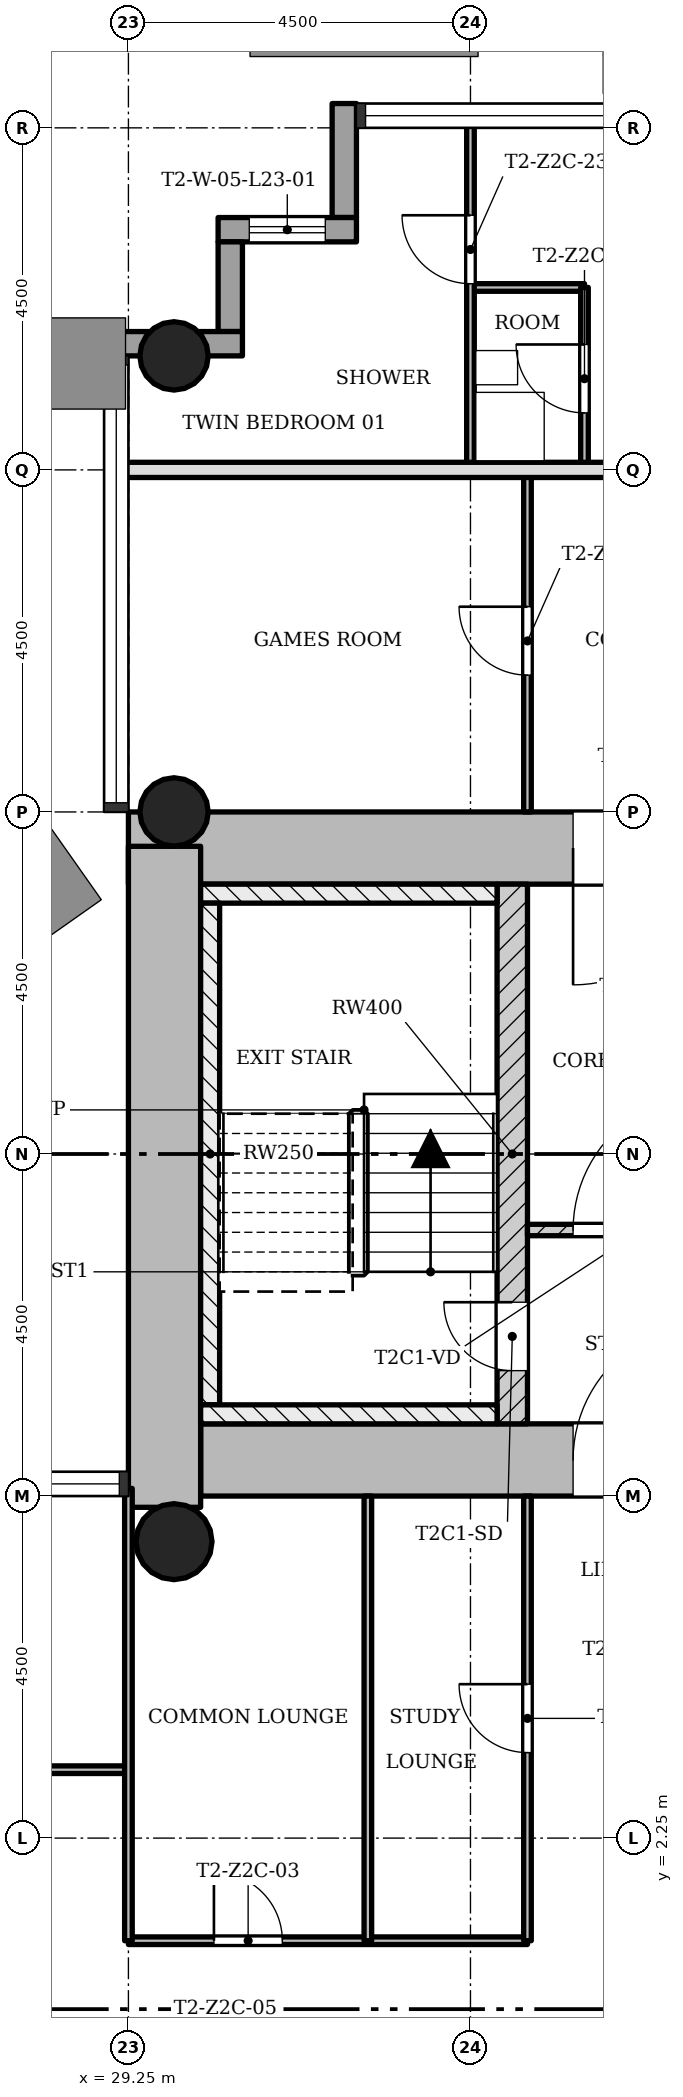
"""IFC4 building model, lengths in metres.
Left out: names, types, materials, properties, quantities, classifications, styles, units other than length and angle.
Written with IfcOpenShell. Run it as: python <this file> out.ifc"""

import sys

from ifc_helpers import new_model, si_unit, direction, frame, frame_2d, origin, origin_2d, place, context, subcontext, project, spatial, rectangle, hollow_circle, extrude, element, fill, save


model = new_model("IFC4")
c1 = context("Model", 3, precision=1e-05, world=origin(), true_north=direction((0.0, 1.0)))
c2 = subcontext(c1, "Body", "Model", "MODEL_VIEW")
j1 = project(units=[si_unit("LENGTHUNIT", "METRE"), si_unit("PLANEANGLEUNIT", "RADIAN")], contexts=[c1])
p1 = place(None, origin())
s1 = spatial("IfcSite", under=j1, at=p1, CompositionType="ELEMENT")
p2 = place(p1, origin())
s2 = spatial("IfcBuilding", under=s1, at=p2, CompositionType="ELEMENT")
p3 = place(p2, frame((0.0, 0.0, 86.8)))
s3 = spatial("IfcBuildingStorey", under=s2, at=p3, CompositionType="ELEMENT", Elevation=86.8)
p4 = place(p3, frame((30.2, 7.225, 0.0), z_axis=(0.0, 0.0, 1.0), x_axis=(1.0, 0.0, 0.0)))
e1 = element("IfcWall", 1, at=p4, inside=s3, PredefinedType="SHEAR", context=c2, shape_type="SweptSolid", body=[
    extrude(rectangle(XDim=12.55, YDim=0.95, at=frame_2d((6.275, 0.0))), origin(), (0.0, 0.0, 1.0), 3.4),
])
p5 = place(p4, frame((4.9, 0.0, 0.0)))
e2 = element("IfcOpeningElement", 2, at=p5, cuts=e1, PredefinedType="OPENING", context=c2, shape_type="SweptSolid", body=[
    extrude(rectangle(XDim=1.8, YDim=2.1, at=frame_2d((0.9, 1.05))), frame((0.0, 0.485, 0.0), z_axis=(0.0, -1.0, 0.0), x_axis=(1.0, 0.0, 0.0)), (0.0, 0.0, 1.0), 0.97),
])
p6 = place(p3, frame((41.8, 15.275, 0.0), z_axis=(0.0, 0.0, 1.0), x_axis=(-1.0, 0.0, 0.0)))
e3 = element("IfcWall", 3, at=p6, inside=s3, PredefinedType="SHEAR", context=c2, shape_type="SweptSolid", body=[
    extrude(rectangle(XDim=12.55, YDim=0.95, at=frame_2d((6.275, 0.0))), origin(), (0.0, 0.0, 1.0), 3.4),
])
p7 = place(p6, frame((4.9, 0.0, 0.0)))
e4 = element("IfcOpeningElement", 4, at=p7, cuts=e3, PredefinedType="OPENING", context=c2, shape_type="SweptSolid", body=[
    extrude(rectangle(XDim=1.8, YDim=2.1, at=frame_2d((0.9, 1.05))), frame((0.0, 0.485, 0.0), z_axis=(0.0, -1.0, 0.0), x_axis=(1.0, 0.0, 0.0)), (0.0, 0.0, 1.0), 0.97),
])
p8 = place(p3, frame((29.725, 15.298, 0.0), z_axis=(0.0, 0.0, 1.0), x_axis=(0.0, -1.0, 0.0)))
e5 = element("IfcWall", 5, at=p8, inside=s3, PredefinedType="SHEAR", context=c2, shape_type="SweptSolid", body=[
    extrude(rectangle(XDim=8.696, YDim=0.95, at=frame_2d((4.348, 0.0))), origin(), (0.0, 0.0, 1.0), 3.4),
])
p9 = place(p3, frame((34.3, 7.7, 0.0), z_axis=(0.0, 0.0, 1.0), x_axis=(0.0, 1.0, 0.0)))
e6 = element("IfcWall", 6, at=p9, inside=s3, PredefinedType="SHEAR", context=c2, shape_type="SweptSolid", body=[
    extrude(rectangle(XDim=7.1, YDim=0.4, at=frame_2d((3.55, 0.0))), origin(), (0.0, 0.0, 1.0), 3.4),
])
p10 = place(p9, frame((0.7, 0.0, 0.0)))
e7 = element("IfcOpeningElement", 7, at=p10, cuts=e6, PredefinedType="OPENING", context=c2, shape_type="SweptSolid", body=[
    extrude(rectangle(XDim=0.9, YDim=2.1, at=frame_2d((0.45, 1.05))), frame((0.0, 0.21, 0.0), z_axis=(0.0, -1.0, 0.0), x_axis=(1.0, 0.0, 0.0)), (0.0, 0.0, 1.0), 0.42),
])
for number, where, z_axis, x_axis in (
    (8, (29.85, 15.75, 0.0), (0.0, 0.0, 1.0), (1.0, 0.0, 0.0)),
    (9, (29.85, 21.75, 0.0), (0.0, 0.0, 1.0), (1.0, 0.0, 0.0)),
):
    element("IfcColumn", number, at=place(p3, frame(where, z_axis=z_axis, x_axis=x_axis)), inside=s3, PredefinedType="COLUMN", context=c2, shape_type="SweptSolid", body=[
        extrude(hollow_circle(Radius=0.45, WallThickness=0.032, at=origin_2d()), origin(), (0.0, 0.0, 1.0), 3.4),
    ])
p11 = place(p3, frame((29.85, 6.15, 0.0), z_axis=(0.0, 0.0, 1.0), x_axis=(1.0, 0.0, 0.0)))
e10 = element("IfcColumn", 10, at=p11, inside=s3, PredefinedType="COLUMN", context=c2, shape_type="SweptSolid", body=[
    extrude(hollow_circle(Radius=0.5, WallThickness=0.036, at=origin_2d()), origin(), (0.0, 0.0, 1.0), 3.4),
])
p12 = place(p3, frame((32.09, 25.07, -0.3), z_axis=(0.0, 0.0, 1.0), x_axis=(0.0, -1.0, 0.0)))
e11 = element("IfcWall", 11, at=p12, inside=s3, PredefinedType="STANDARD", context=c2, shape_type="SweptSolid", body=[
    extrude(rectangle(XDim=1.5, YDim=0.32, at=frame_2d((0.75, 0.0))), origin(), (0.0, 0.0, 1.0), 3.4),
])
p13 = place(p3, frame((32.25, 23.41, -0.3), z_axis=(0.0, 0.0, 1.0), x_axis=(-1.0, 0.0, 0.0)))
e12 = element("IfcWall", 12, at=p13, inside=s3, PredefinedType="STANDARD", context=c2, shape_type="SweptSolid", body=[
    extrude(rectangle(XDim=1.82, YDim=0.32, at=frame_2d((0.91, 0.0))), origin(), (0.0, 0.0, 1.0), 3.4),
])
p14 = place(p13, frame((0.41, 0.0, 1.2)))
e13 = element("IfcOpeningElement", 13, at=p14, cuts=e12, PredefinedType="OPENING", context=c2, shape_type="SweptSolid", body=[
    extrude(rectangle(XDim=1.0, YDim=1.5, at=frame_2d((0.5, 0.75))), frame((0.0, 0.17, 0.0), z_axis=(0.0, -1.0, 0.0), x_axis=(1.0, 0.0, 0.0)), (0.0, 0.0, 1.0), 0.34),
])
p15 = place(p3, frame((30.59, 23.25, -0.3), z_axis=(0.0, 0.0, 1.0), x_axis=(0.0, -1.0, 0.0)))
e14 = element("IfcWall", 14, at=p15, inside=s3, PredefinedType="STANDARD", context=c2, shape_type="SweptSolid", body=[
    extrude(rectangle(XDim=1.18, YDim=0.32, at=frame_2d((0.59, 0.0))), origin(), (0.0, 0.0, 1.0), 3.4),
])
p16 = place(p3, frame((30.75, 21.91, -0.3), z_axis=(0.0, 0.0, 1.0), x_axis=(-1.0, 0.0, 0.0)))
e15 = element("IfcWall", 15, at=p16, inside=s3, PredefinedType="STANDARD", context=c2, shape_type="SweptSolid", body=[
    extrude(rectangle(XDim=1.82, YDim=0.32, at=frame_2d((0.91, 0.0))), origin(), (0.0, 0.0, 1.0), 3.4),
])
p17 = place(p3, frame((37.5, 10.25, 0.0), z_axis=(0.0, 0.0, 1.0), x_axis=(-1.0, 0.0, 0.0)))
e16 = element("IfcWall", 16, at=p17, inside=s3, PredefinedType="PARTITIONING", context=c2, shape_type="SweptSolid", body=[
    extrude(rectangle(XDim=3.0, YDim=0.15, at=frame_2d((1.5, 0.0))), origin(), (0.0, 0.0, 1.0), 3.0),
])
p18 = place(p17, frame((0.6, 0.0, 0.0)))
e17 = element("IfcOpeningElement", 17, at=p18, cuts=e16, PredefinedType="OPENING", context=c2, shape_type="SweptSolid", body=[
    extrude(rectangle(XDim=1.8, YDim=2.1, at=frame_2d((0.9, 1.05))), frame((0.0, 0.085, 0.0), z_axis=(0.0, -1.0, 0.0), x_axis=(1.0, 0.0, 0.0)), (0.0, 0.0, 1.0), 0.17),
])
p19 = place(p3, frame((34.5, 0.9, 0.0), z_axis=(0.0, 0.0, 1.0), x_axis=(-1.0, 0.0, 0.0)))
e18 = element("IfcWall", 18, at=p19, inside=s3, PredefinedType="PARTITIONING", context=c2, shape_type="SweptSolid", body=[
    extrude(rectangle(XDim=5.25, YDim=0.1, at=frame_2d((2.625, 0.0))), origin(), (0.0, 0.0, 1.0), 3.0),
])
p20 = place(p19, frame((3.225, 0.0, 0.0)))
e19 = element("IfcOpeningElement", 19, at=p20, cuts=e18, PredefinedType="OPENING", context=c2, shape_type="SweptSolid", body=[
    extrude(rectangle(XDim=0.9, YDim=2.1, at=frame_2d((0.45, 1.05))), frame((0.0, 0.06, 0.0), z_axis=(0.0, -1.0, 0.0), x_axis=(1.0, 0.0, 0.0)), (0.0, 0.0, 1.0), 0.12),
])
p21 = place(p3, frame((29.25, 3.15, 0.0), z_axis=(0.0, 0.0, 1.0), x_axis=(-1.0, 0.0, 0.0)))
e20 = element("IfcWall", 20, at=p21, inside=s3, PredefinedType="PARTITIONING", context=c2, shape_type="SweptSolid", body=[
    extrude(rectangle(XDim=9.0, YDim=0.1, at=frame_2d((4.5, 0.0))), origin(), (0.0, 0.0, 1.0), 3.0),
])
p22 = place(p21, frame((2.55, 0.0, 0.0)))
e21 = element("IfcOpeningElement", 21, at=p22, cuts=e20, PredefinedType="OPENING", context=c2, shape_type="SweptSolid", body=[
    extrude(rectangle(XDim=0.9, YDim=2.1, at=frame_2d((0.45, 1.05))), frame((0.0, 0.06, 0.0), z_axis=(0.0, -1.0, 0.0), x_axis=(1.0, 0.0, 0.0)), (0.0, 0.0, 1.0), 0.12),
])
p23 = place(p3, frame((42.85, 20.25, 0.0), z_axis=(0.0, 0.0, 1.0), x_axis=(-1.0, 0.0, 0.0)))
e22 = element("IfcWall", 22, at=p23, inside=s3, PredefinedType="SOLIDWALL", context=c2, shape_type="SweptSolid", body=[
    extrude(rectangle(XDim=13.7, YDim=0.2, at=frame_2d((6.85, 0.0))), origin(), (0.0, 0.0, 1.0), 3.0),
])
p24 = place(p23, frame((6.4, 0.0, 0.0)))
e23 = element("IfcOpeningElement", 23, at=p24, cuts=e22, PredefinedType="OPENING", context=c2, shape_type="SweptSolid", body=[
    extrude(rectangle(XDim=0.9, YDim=2.1, at=frame_2d((0.45, 1.05))), frame((0.0, 0.11, 0.0), z_axis=(0.0, -1.0, 0.0), x_axis=(1.0, 0.0, 0.0)), (0.0, 0.0, 1.0), 0.22),
])
p25 = place(p3, frame((35.25, 22.65, 0.0), z_axis=(0.0, 0.0, 1.0), x_axis=(-1.0, 0.0, 0.0)))
e24 = element("IfcWall", 24, at=p25, inside=s3, PredefinedType="PARTITIONING", context=c2, shape_type="SweptSolid", body=[
    extrude(rectangle(XDim=1.5, YDim=0.1, at=frame_2d((0.75, 0.0))), origin(), (0.0, 0.0, 1.0), 3.0),
])
p26 = place(p3, frame((35.25, 20.25, 0.0), z_axis=(0.0, 0.0, 1.0), x_axis=(0.0, 1.0, 0.0)))
e25 = element("IfcWall", 25, at=p26, inside=s3, PredefinedType="PARTITIONING", context=c2, shape_type="SweptSolid", body=[
    extrude(rectangle(XDim=2.4, YDim=0.1, at=frame_2d((1.2, 0.0))), origin(), (0.0, 0.0, 1.0), 3.0),
])
p27 = place(p26, frame((0.75, 0.0, 0.0)))
e26 = element("IfcOpeningElement", 26, at=p27, cuts=e25, PredefinedType="OPENING", context=c2, shape_type="SweptSolid", body=[
    extrude(rectangle(XDim=0.9, YDim=2.1, at=frame_2d((0.45, 1.05))), frame((0.0, 0.06, 0.0), z_axis=(0.0, -1.0, 0.0), x_axis=(1.0, 0.0, 0.0)), (0.0, 0.0, 1.0), 0.12),
])
p28 = place(p3, frame((34.5, 0.9, 0.0), z_axis=(0.0, 0.0, 1.0), x_axis=(0.0, 1.0, 0.0)))
e27 = element("IfcWall", 27, at=p28, inside=s3, PredefinedType="PARTITIONING", context=c2, shape_type="SweptSolid", body=[
    extrude(rectangle(XDim=5.85, YDim=0.1, at=frame_2d((2.925, 0.0))), origin(), (0.0, 0.0, 1.0), 3.0),
])
p29 = place(p28, frame((2.475, 0.0, 0.0)))
e28 = element("IfcOpeningElement", 28, at=p29, cuts=e27, PredefinedType="OPENING", context=c2, shape_type="SweptSolid", body=[
    extrude(rectangle(XDim=0.9, YDim=2.1, at=frame_2d((0.45, 1.05))), frame((0.0, 0.06, 0.0), z_axis=(0.0, -1.0, 0.0), x_axis=(1.0, 0.0, 0.0)), (0.0, 0.0, 1.0), 0.12),
])
p30 = place(p3, frame((34.5, 15.75, 0.0), z_axis=(0.0, 0.0, 1.0), x_axis=(0.0, 1.0, 0.0)))
e29 = element("IfcWall", 29, at=p30, inside=s3, PredefinedType="PARTITIONING", context=c2, shape_type="SweptSolid", body=[
    extrude(rectangle(XDim=4.5, YDim=0.1, at=frame_2d((2.25, 0.0))), origin(), (0.0, 0.0, 1.0), 3.0),
])
p31 = place(p30, frame((1.8, 0.0, 0.0)))
e30 = element("IfcOpeningElement", 30, at=p31, cuts=e29, PredefinedType="OPENING", context=c2, shape_type="SweptSolid", body=[
    extrude(rectangle(XDim=0.9, YDim=2.1, at=frame_2d((0.45, 1.05))), frame((0.0, 0.06, 0.0), z_axis=(0.0, -1.0, 0.0), x_axis=(1.0, 0.0, 0.0)), (0.0, 0.0, 1.0), 0.12),
])
p32 = place(p3, frame((33.75, 20.25, 0.0), z_axis=(0.0, 0.0, 1.0), x_axis=(0.0, 1.0, 0.0)))
e31 = element("IfcWall", 31, at=p32, inside=s3, PredefinedType="PARTITIONING", context=c2, shape_type="SweptSolid", body=[
    extrude(rectangle(XDim=4.6, YDim=0.1, at=frame_2d((2.3, 0.0))), origin(), (0.0, 0.0, 1.0), 3.0),
])
p33 = place(p32, frame((2.45, 0.0, 0.0)))
e32 = element("IfcOpeningElement", 32, at=p33, cuts=e31, PredefinedType="OPENING", context=c2, shape_type="SweptSolid", body=[
    extrude(rectangle(XDim=0.9, YDim=2.1, at=frame_2d((0.45, 1.05))), frame((0.0, 0.06, 0.0), z_axis=(0.0, -1.0, 0.0), x_axis=(1.0, 0.0, 0.0)), (0.0, 0.0, 1.0), 0.12),
])
p34 = place(p3, frame((32.4, 0.9, 0.0), z_axis=(0.0, 0.0, 1.0), x_axis=(0.0, 1.0, 0.0)))
e33 = element("IfcWall", 33, at=p34, inside=s3, PredefinedType="PARTITIONING", context=c2, shape_type="SweptSolid", body=[
    extrude(rectangle(XDim=5.85, YDim=0.1, at=frame_2d((2.925, 0.0))), origin(), (0.0, 0.0, 1.0), 3.0),
])
p35 = place(p3, frame((29.25, 0.9, 0.0), z_axis=(0.0, 0.0, 1.0), x_axis=(0.0, 1.0, 0.0)))
e34 = element("IfcWall", 34, at=p35, inside=s3, PredefinedType="PARTITIONING", context=c2, shape_type="SweptSolid", body=[
    extrude(rectangle(XDim=5.95, YDim=0.1, at=frame_2d((2.975, 0.0))), origin(), (0.0, 0.0, 1.0), 3.0),
])
p36 = place(p3, frame((34.1, 14.675, 0.0), z_axis=(0.0, 0.0, 1.0), x_axis=(-1.0, 0.0, 0.0)))
e35 = element("IfcWall", 35, at=p36, inside=s3, PredefinedType="SHEAR", context=c2, shape_type="SweptSolid", body=[
    extrude(rectangle(XDim=3.9, YDim=0.25, at=frame_2d((1.95, 0.0))), origin(), (0.0, 0.0, 1.0), 3.4),
])
p37 = place(p3, frame((30.325, 7.95, 0.0), z_axis=(0.0, 0.0, 1.0), x_axis=(0.0, 1.0, 0.0)))
e36 = element("IfcWall", 36, at=p37, inside=s3, PredefinedType="SHEAR", context=c2, shape_type="SweptSolid", body=[
    extrude(rectangle(XDim=6.6, YDim=0.25, at=frame_2d((3.3, 0.0))), origin(), (0.0, 0.0, 1.0), 3.4),
])
p38 = place(p3, frame((34.1, 7.825, 0.0), z_axis=(0.0, 0.0, 1.0), x_axis=(-1.0, 0.0, 0.0)))
e37 = element("IfcWall", 37, at=p38, inside=s3, PredefinedType="SHEAR", context=c2, shape_type="SweptSolid", body=[
    extrude(rectangle(XDim=3.9, YDim=0.25, at=frame_2d((1.95, 0.0))), origin(), (0.0, 0.0, 1.0), 3.4),
])
p39 = place(p18, origin())
e38 = element("IfcDoor", 38, at=p39, inside=s3, OperationType="SINGLE_SWING_LEFT", PredefinedType="DOOR", context=c2, shape_type="SweptSolid", body=[
    extrude(rectangle(XDim=1.8, YDim=2.1, at=frame_2d((0.9, 1.05))), frame((0.0, 0.025, 0.0), z_axis=(0.0, -1.0, 0.0), x_axis=(1.0, 0.0, 0.0)), (0.0, 0.0, 1.0), 0.05),
])
fill(e17, e38)
p40 = place(p29, origin())
e39 = element("IfcDoor", 39, at=p40, inside=s3, OperationType="SINGLE_SWING_LEFT", PredefinedType="DOOR", context=c2, shape_type="SweptSolid", body=[
    extrude(rectangle(XDim=0.9, YDim=2.1, at=frame_2d((0.45, 1.05))), frame((0.0, 0.025, 0.0), z_axis=(0.0, -1.0, 0.0), x_axis=(1.0, 0.0, 0.0)), (0.0, 0.0, 1.0), 0.05),
])
fill(e28, e39)
p41 = place(p20, origin())
e40 = element("IfcDoor", 40, at=p41, inside=s3, OperationType="SINGLE_SWING_RIGHT", PredefinedType="DOOR", context=c2, shape_type="SweptSolid", body=[
    extrude(rectangle(XDim=0.9, YDim=2.1, at=frame_2d((0.45, 1.05))), frame((0.0, 0.025, 0.0), z_axis=(0.0, -1.0, 0.0), x_axis=(1.0, 0.0, 0.0)), (0.0, 0.0, 1.0), 0.05),
])
fill(e19, e40)
p42 = place(p31, origin())
e41 = element("IfcDoor", 41, at=p42, inside=s3, OperationType="SINGLE_SWING_LEFT", PredefinedType="DOOR", context=c2, shape_type="SweptSolid", body=[
    extrude(rectangle(XDim=0.9, YDim=2.1, at=frame_2d((0.45, 1.05))), frame((0.0, 0.025, 0.0), z_axis=(0.0, -1.0, 0.0), x_axis=(1.0, 0.0, 0.0)), (0.0, 0.0, 1.0), 0.05),
])
fill(e30, e41)
p43 = place(p27, origin())
e42 = element("IfcDoor", 42, at=p43, inside=s3, OperationType="SINGLE_SWING_LEFT", PredefinedType="DOOR", context=c2, shape_type="SweptSolid", body=[
    extrude(rectangle(XDim=0.9, YDim=2.1, at=frame_2d((0.45, 1.05))), frame((0.0, 0.025, 0.0), z_axis=(0.0, -1.0, 0.0), x_axis=(1.0, 0.0, 0.0)), (0.0, 0.0, 1.0), 0.05),
])
fill(e26, e42)
p44 = place(p33, origin())
e43 = element("IfcDoor", 43, at=p44, inside=s3, OperationType="SINGLE_SWING_LEFT", PredefinedType="DOOR", context=c2, shape_type="SweptSolid", body=[
    extrude(rectangle(XDim=0.9, YDim=2.1, at=frame_2d((0.45, 1.05))), frame((0.0, 0.025, 0.0), z_axis=(0.0, -1.0, 0.0), x_axis=(1.0, 0.0, 0.0)), (0.0, 0.0, 1.0), 0.05),
])
fill(e32, e43)
p45 = place(p10, origin())
e44 = element("IfcDoor", 44, at=p45, inside=s3, OperationType="SINGLE_SWING_LEFT", PredefinedType="DOOR", context=c2, shape_type="SweptSolid", body=[
    extrude(rectangle(XDim=0.9, YDim=2.1, at=frame_2d((0.45, 1.05))), frame((0.0, 0.025, 0.0), z_axis=(0.0, -1.0, 0.0), x_axis=(1.0, 0.0, 0.0)), (0.0, 0.0, 1.0), 0.05),
])
fill(e7, e44)
p46 = place(p5, origin())
e45 = element("IfcDoor", 45, at=p46, inside=s3, OperationType="SINGLE_SWING_LEFT", PredefinedType="DOOR", context=c2, shape_type="SweptSolid", body=[
    extrude(rectangle(XDim=1.8, YDim=2.1, at=frame_2d((0.9, 1.05))), frame((0.0, 0.025, 0.0), z_axis=(0.0, -1.0, 0.0), x_axis=(1.0, 0.0, 0.0)), (0.0, 0.0, 1.0), 0.05),
])
fill(e2, e45)
p47 = place(p7, origin())
e46 = element("IfcDoor", 46, at=p47, inside=s3, OperationType="SINGLE_SWING_LEFT", PredefinedType="DOOR", context=c2, shape_type="SweptSolid", body=[
    extrude(rectangle(XDim=1.8, YDim=2.1, at=frame_2d((0.9, 1.05))), frame((0.0, 0.025, 0.0), z_axis=(0.0, -1.0, 0.0), x_axis=(1.0, 0.0, 0.0)), (0.0, 0.0, 1.0), 0.05),
])
fill(e4, e46)
p48 = place(p14, origin())
e47 = element("IfcWindow", 47, at=p48, inside=s3, PartitioningType="SINGLE_PANEL", PredefinedType="WINDOW", context=c2, shape_type="SweptSolid", body=[
    extrude(rectangle(XDim=1.0, YDim=1.5, at=frame_2d((0.5, 0.75))), frame((0.0, 0.03, 0.0), z_axis=(0.0, -1.0, 0.0), x_axis=(1.0, 0.0, 0.0)), (0.0, 0.0, 1.0), 0.06),
])
fill(e13, e47)
save(model, sys.argv[1])
